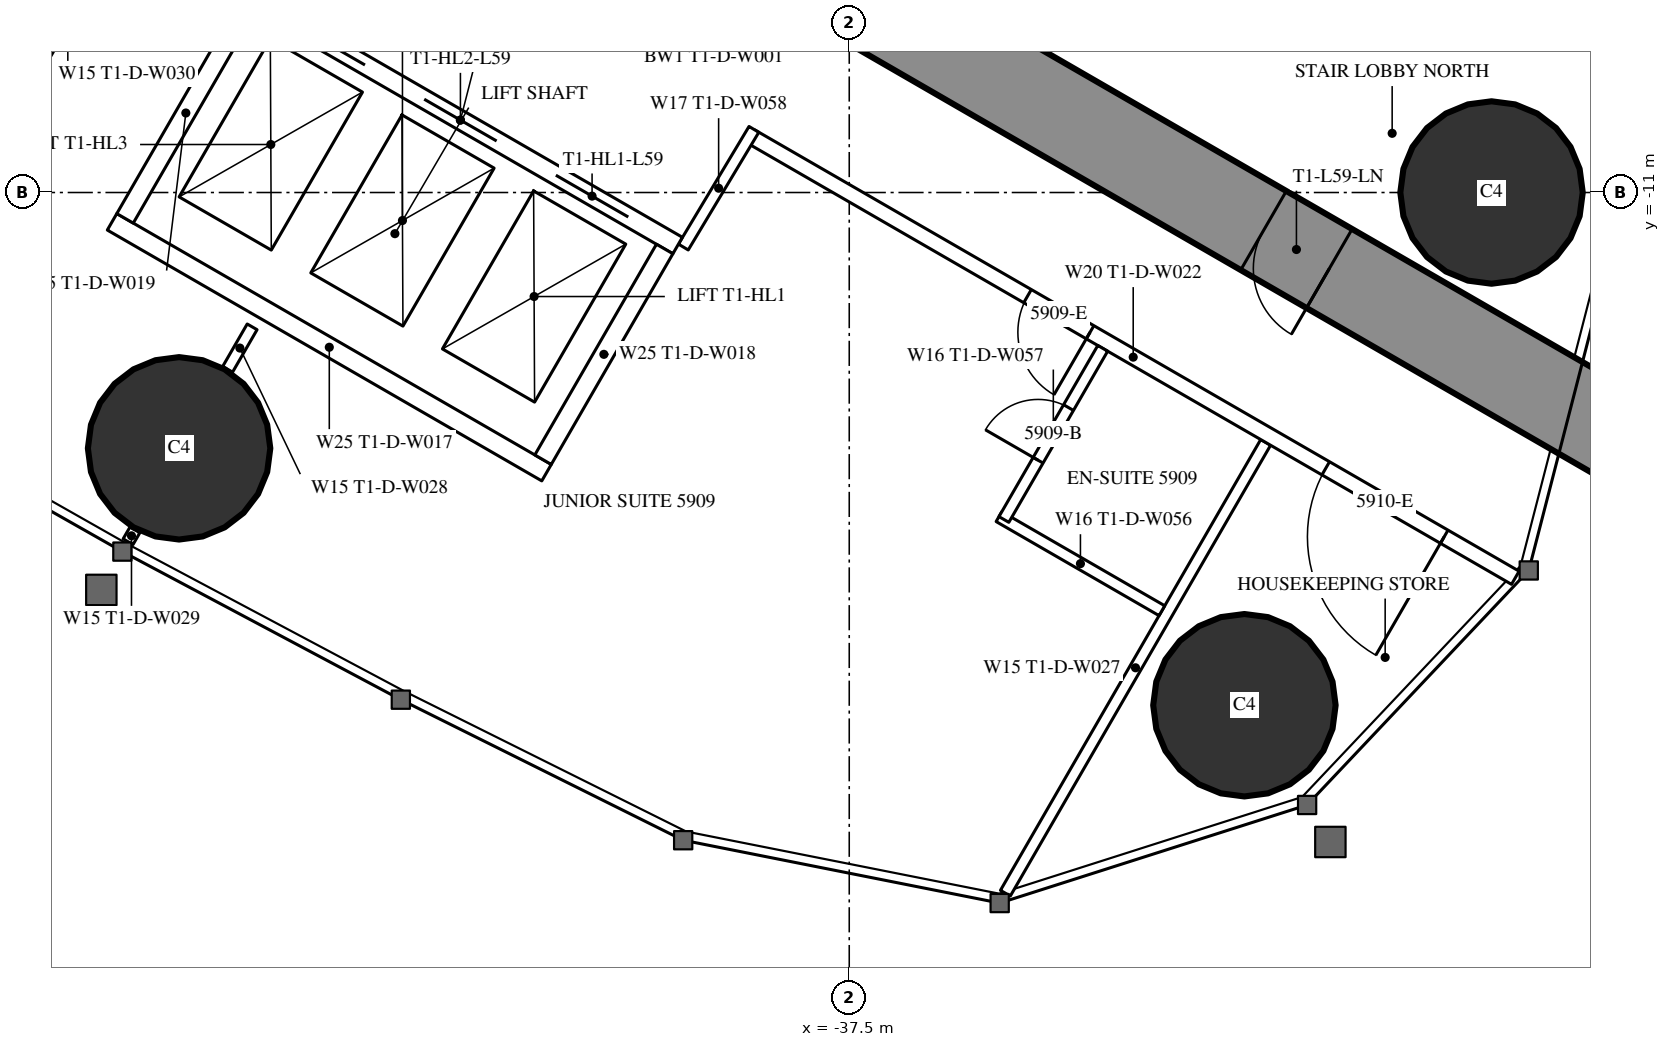
"""IFC4 building model, lengths in metres.
Left out: names, types, materials, properties, quantities, classifications, styles, units other than length and angle.
Written with IfcOpenShell. Run it as: python <this file> out.ifc"""

import sys

from ifc_helpers import new_model, si_unit, direction, frame, frame_2d, origin, origin_2d, place, context, subcontext, project, spatial, rectangle, circle, extrude, element, fill, save


model = new_model("IFC4")
c1 = context("Model", 3, precision=1e-05, world=origin(), true_north=direction((0.0, 1.0)))
c2 = subcontext(c1, "Body", "Model", "MODEL_VIEW")
j1 = project(units=[si_unit("LENGTHUNIT", "METRE"), si_unit("PLANEANGLEUNIT", "RADIAN")], contexts=[c1])
p1 = place(None, origin())
s1 = spatial("IfcSite", under=j1, at=p1, CompositionType="ELEMENT")
p2 = place(p1, origin())
s2 = spatial("IfcBuilding", under=s1, at=p2, CompositionType="ELEMENT")
p3 = place(p2, frame((0.0, 0.0, 222.5)))
s3 = spatial("IfcBuildingStorey", under=s2, at=p3, CompositionType="ELEMENT", Elevation=222.5)
for number, where, z_axis, x_axis in (
    (1, (-32.301, -17.745, 0.0), (0.0, 0.0, 1.0), (1.0, 0.0, 0.0)),
    (2, (-29.05, -11.0, 0.0), (0.0, 0.0, 1.0), (1.0, 0.0, 0.0)),
    (3, (-46.317, -14.365, 0.0), (0.0, 0.0, 1.0), (1.0, 0.0, 0.0)),
):
    element("IfcColumn", number, at=place(p3, frame(where, z_axis=z_axis, x_axis=x_axis)), inside=s3, PredefinedType="COLUMN", context=c2, shape_type="SweptSolid", body=[
        extrude(circle(Radius=1.2, at=origin_2d()), origin(), (0.0, 0.0, 1.0), 3.6),
    ])
p4 = place(p3, frame((-27.2, -14.3, 0.0), z_axis=(0.0, 0.0, 1.0), x_axis=(-0.866024021859, 0.500002393557, 0.0)))
e4 = element("IfcWall", 4, at=p4, inside=s3, PredefinedType="SHEAR", context=c2, shape_type="SweptSolid", body=[
    extrude(rectangle(XDim=27.907, YDim=1.2, at=frame_2d((13.954, 0.0))), origin(), (0.0, 0.0, 1.0), 3.6),
])
p5 = place(p4, frame((4.6, 0.0, 0.0)))
e5 = element("IfcOpeningElement", 5, at=p5, cuts=e4, PredefinedType="OPENING", context=c2, shape_type="SweptSolid", body=[
    extrude(rectangle(XDim=1.0, YDim=2.2, at=frame_2d((0.5, 1.1))), frame((0.0, 0.61, 0.0), z_axis=(0.0, -1.0, 0.0), x_axis=(1.0, 0.0, 0.0)), (0.0, 0.0, 1.0), 1.22),
])
p6 = place(p4, frame((13.395, 0.0, 0.0)))
e6 = element("IfcOpeningElement", 6, at=p6, cuts=e4, PredefinedType="OPENING", context=c2, shape_type="SweptSolid", body=[
    extrude(rectangle(XDim=1.8, YDim=2.2, at=frame_2d((0.9, 1.1))), frame((0.0, 0.61, 0.0), z_axis=(0.0, -1.0, 0.0), x_axis=(1.0, 0.0, 0.0)), (0.0, 0.0, 1.0), 1.22),
])
p7 = place(p3, frame((-32.022, -14.287, 0.0), z_axis=(0.0, 0.0, 1.0), x_axis=(-0.50000019414, -0.866025291697, 0.0)))
e7 = element("IfcWall", 7, at=p7, inside=s3, PredefinedType="PARTITIONING", context=c2, shape_type="SweptSolid", body=[
    extrude(rectangle(XDim=6.848, YDim=0.15, at=frame_2d((3.424, 0.0))), origin(), (0.0, 0.0, 1.0), 3.35),
])
p8 = place(p3, frame((-46.898, -15.439, 0.0), z_axis=(0.0, 0.0, 1.0), x_axis=(-0.500232303069, -0.865891241997, 0.0)))
e8 = element("IfcWall", 8, at=p8, inside=s3, PredefinedType="PARTITIONING", context=c2, shape_type="SweptSolid", body=[
    extrude(rectangle(XDim=0.18, YDim=0.15, at=frame_2d((0.09, 0.0))), origin(), (0.0, 0.0, 1.0), 2.45),
])
p9 = place(p3, frame((-46.274, -6.059, 0.0), z_axis=(0.0, 0.0, 1.0), x_axis=(-0.500020471368, -0.866013584312, 0.0)))
e9 = element("IfcWall", 9, at=p9, inside=s3, PredefinedType="PARTITIONING", context=c2, shape_type="SweptSolid", body=[
    extrude(rectangle(XDim=6.028, YDim=0.15, at=frame_2d((3.014, 0.0))), origin(), (0.0, 0.0, 1.0), 2.45),
])
p10 = place(p3, frame((-45.356, -12.767, 0.0), z_axis=(0.0, 0.0, 1.0), x_axis=(-0.499886366516, -0.866091000168, 0.0)))
e10 = element("IfcWall", 10, at=p10, inside=s3, PredefinedType="PARTITIONING", context=c2, shape_type="SweptSolid", body=[
    extrude(rectangle(XDim=0.645, YDim=0.15, at=frame_2d((0.322, 0.0))), origin(), (0.0, 0.0, 1.0), 3.35),
])
p11 = place(p3, frame((-28.737, -16.068, 0.0), z_axis=(0.0, 0.0, 1.0), x_axis=(-0.866029399323, 0.49999307946, 0.0)))
e11 = element("IfcWall", 11, at=p11, inside=s3, PredefinedType="PARTITIONING", context=c2, shape_type="SweptSolid", body=[
    extrude(rectangle(XDim=11.61, YDim=0.2, at=frame_2d((5.805, 0.0))), origin(), (0.0, 0.0, 1.0), 3.35),
])
p12 = place(p11, frame((1.08, 0.0, 0.0)))
e12 = element("IfcOpeningElement", 12, at=p12, cuts=e11, PredefinedType="OPENING", context=c2, shape_type="SweptSolid", body=[
    extrude(rectangle(XDim=1.8, YDim=2.03, at=frame_2d((0.9, 1.015))), frame((0.0, 0.11, 0.0), z_axis=(0.0, -1.0, 0.0), x_axis=(1.0, 0.0, 0.0)), (0.0, 0.0, 1.0), 0.22),
])
p13 = place(p11, frame((6.46, 0.0, 0.0)))
e13 = element("IfcOpeningElement", 13, at=p13, cuts=e11, PredefinedType="OPENING", context=c2, shape_type="SweptSolid", body=[
    extrude(rectangle(XDim=0.95, YDim=2.2, at=frame_2d((0.475, 1.1))), frame((0.0, 0.11, 0.0), z_axis=(0.0, -1.0, 0.0), x_axis=(1.0, 0.0, 0.0)), (0.0, 0.0, 1.0), 0.22),
])
p14 = place(p3, frame((-39.683, -11.718, 0.0), z_axis=(0.0, 0.0, 1.0), x_axis=(0.514336634837, 0.857588377991, 0.0)))
e14 = element("IfcWall", 14, at=p14, inside=s3, PredefinedType="PARTITIONING", context=c2, shape_type="SweptSolid", body=[
    extrude(rectangle(XDim=1.805, YDim=0.15, at=frame_2d((0.903, 0.0))), origin(), (0.0, 0.0, 1.0), 3.35),
])
p15 = place(p3, frame((-33.387, -16.502, 0.0), z_axis=(0.0, 0.0, 1.0), x_axis=(-0.866006523861, 0.500032699561, 0.0)))
e15 = element("IfcWall", 15, at=p15, inside=s3, PredefinedType="PARTITIONING", context=c2, shape_type="SweptSolid", body=[
    extrude(rectangle(XDim=2.475, YDim=0.15, at=frame_2d((1.237, 0.0))), origin(), (0.0, 0.0, 1.0), 3.35),
])
p16 = place(p3, frame((-34.165, -13.05, 0.0), z_axis=(0.0, 0.0, 1.0), x_axis=(-0.500047596559, -0.865997922154, 0.0)))
e16 = element("IfcWall", 16, at=p16, inside=s3, PredefinedType="PARTITIONING", context=c2, shape_type="SweptSolid", body=[
    extrude(rectangle(XDim=2.6, YDim=0.15, at=frame_2d((1.3, 0.0))), origin(), (0.0, 0.0, 1.0), 3.35),
])
p17 = place(p16, frame((0.9, 0.0, 0.0)))
e17 = element("IfcOpeningElement", 17, at=p17, cuts=e16, PredefinedType="OPENING", context=c2, shape_type="SweptSolid", body=[
    extrude(rectangle(XDim=0.8, YDim=2.2, at=frame_2d((0.4, 1.1))), frame((0.0, 0.085, 0.0), z_axis=(0.0, -1.0, 0.0), x_axis=(1.0, 0.0, 0.0)), (0.0, 0.0, 1.0), 0.17),
])
p18 = place(p3, frame((-39.758, -11.697, 0.0), z_axis=(0.0, 0.0, 1.0), x_axis=(-0.866024194504, 0.500002094529, 0.0)))
e18 = element("IfcWall", 18, at=p18, inside=s3, PredefinedType="PARTITIONING", context=c2, shape_type="SweptSolid", body=[
    extrude(rectangle(XDim=6.6, YDim=0.25, at=frame_2d((3.3, 0.0))), origin(), (0.0, 0.0, 1.0), 3.35),
])
p19 = place(p18, frame((0.75, 0.0, 0.0)))
e19 = element("IfcOpeningElement", 19, at=p19, cuts=e18, PredefinedType="OPENING", context=c2, shape_type="SweptSolid", body=[
    extrude(rectangle(XDim=1.1, YDim=2.2, at=frame_2d((0.55, 1.1))), frame((0.0, 0.135, 0.0), z_axis=(0.0, -1.0, 0.0), x_axis=(1.0, 0.0, 0.0)), (0.0, 0.0, 1.0), 0.27),
])
p20 = place(p18, frame((2.75, 0.0, 0.0)))
e20 = element("IfcOpeningElement", 20, at=p20, cuts=e18, PredefinedType="OPENING", context=c2, shape_type="SweptSolid", body=[
    extrude(rectangle(XDim=1.1, YDim=2.2, at=frame_2d((0.55, 1.1))), frame((0.0, 0.135, 0.0), z_axis=(0.0, -1.0, 0.0), x_axis=(1.0, 0.0, 0.0)), (0.0, 0.0, 1.0), 0.27),
])
p21 = place(p18, frame((4.75, 0.0, 0.0)))
e21 = element("IfcOpeningElement", 21, at=p21, cuts=e18, PredefinedType="OPENING", context=c2, shape_type="SweptSolid", body=[
    extrude(rectangle(XDim=1.1, YDim=2.2, at=frame_2d((0.55, 1.1))), frame((0.0, 0.135, 0.0), z_axis=(0.0, -1.0, 0.0), x_axis=(1.0, 0.0, 0.0)), (0.0, 0.0, 1.0), 0.27),
])
p22 = place(p3, frame((-41.482, -14.686, 0.0), z_axis=(0.0, 0.0, 1.0), x_axis=(-0.86603344179, 0.499986077507, 0.0)))
e22 = element("IfcWall", 22, at=p22, inside=s3, PredefinedType="PARTITIONING", context=c2, shape_type="SweptSolid", body=[
    extrude(rectangle(XDim=6.6, YDim=0.25, at=frame_2d((3.3, 0.0))), origin(), (0.0, 0.0, 1.0), 3.35),
])
for number, where, z_axis, x_axis in (
    (23, (-39.928, -11.743, 0.0), (0.0, 0.0, 1.0), (-0.5, -0.866, 0.0)),
    (24, (-45.428, -8.568, 0.0), (0.0, 0.0, 1.0), (-0.5, -0.866, 0.0)),
):
    element("IfcWall", number, at=place(p3, frame(where, z_axis=z_axis, x_axis=x_axis)), inside=s3, PredefinedType="PARTITIONING", context=c2, shape_type="SweptSolid", body=[
        extrude(rectangle(XDim=3.201, YDim=0.25, at=frame_2d((1.6, 0.0))), origin(), (0.0, 0.0, 1.0), 3.35),
    ])
p23 = place(p12, origin())
e25 = element("IfcDoor", 25, at=p23, inside=s3, OperationType="DOUBLE_DOOR_SINGLE_SWING", PredefinedType="DOOR", context=c2, shape_type="SweptSolid", body=[
    extrude(rectangle(XDim=1.8, YDim=2.03, at=frame_2d((0.9, 1.015))), frame((0.0, 0.025, 0.0), z_axis=(0.0, -1.0, 0.0), x_axis=(1.0, 0.0, 0.0)), (0.0, 0.0, 1.0), 0.05),
])
fill(e12, e25)
p24 = place(p17, origin())
e26 = element("IfcDoor", 26, at=p24, inside=s3, OperationType="SINGLE_SWING_RIGHT", PredefinedType="DOOR", context=c2, shape_type="SweptSolid", body=[
    extrude(rectangle(XDim=0.8, YDim=2.2, at=frame_2d((0.4, 1.1))), frame((0.0, 0.025, 0.0), z_axis=(0.0, -1.0, 0.0), x_axis=(1.0, 0.0, 0.0)), (0.0, 0.0, 1.0), 0.05),
])
fill(e17, e26)
p25 = place(p13, origin())
e27 = element("IfcDoor", 27, at=p25, inside=s3, OperationType="SINGLE_SWING_LEFT", PredefinedType="DOOR", context=c2, shape_type="SweptSolid", body=[
    extrude(rectangle(XDim=0.95, YDim=2.2, at=frame_2d((0.475, 1.1))), frame((0.0, 0.025, 0.0), z_axis=(0.0, -1.0, 0.0), x_axis=(1.0, 0.0, 0.0)), (0.0, 0.0, 1.0), 0.05),
])
fill(e13, e27)
p26 = place(p5, origin())
e28 = element("IfcDoor", 28, at=p26, inside=s3, OperationType="SINGLE_SWING_LEFT", PredefinedType="DOOR", context=c2, shape_type="SweptSolid", body=[
    extrude(rectangle(XDim=1.0, YDim=2.2, at=frame_2d((0.5, 1.1))), frame((0.0, 0.025, 0.0), z_axis=(0.0, -1.0, 0.0), x_axis=(1.0, 0.0, 0.0)), (0.0, 0.0, 1.0), 0.05),
])
fill(e5, e28)
p27 = place(p19, origin())
e29 = element("IfcDoor", 29, at=p27, inside=s3, OperationType="DOUBLE_DOOR_SLIDING", PredefinedType="USERDEFINED", context=c2, shape_type="SweptSolid", body=[
    extrude(rectangle(XDim=1.1, YDim=2.2, at=frame_2d((0.55, 1.1))), frame((0.0, 0.025, 0.0), z_axis=(0.0, -1.0, 0.0), x_axis=(1.0, 0.0, 0.0)), (0.0, 0.0, 1.0), 0.05),
])
fill(e19, e29)
p28 = place(p20, origin())
e30 = element("IfcDoor", 30, at=p28, inside=s3, OperationType="DOUBLE_DOOR_SLIDING", PredefinedType="USERDEFINED", context=c2, shape_type="SweptSolid", body=[
    extrude(rectangle(XDim=1.1, YDim=2.2, at=frame_2d((0.55, 1.1))), frame((0.0, 0.025, 0.0), z_axis=(0.0, -1.0, 0.0), x_axis=(1.0, 0.0, 0.0)), (0.0, 0.0, 1.0), 0.05),
])
fill(e20, e30)
p29 = place(p21, origin())
e31 = element("IfcDoor", 31, at=p29, inside=s3, OperationType="DOUBLE_DOOR_SLIDING", PredefinedType="USERDEFINED", context=c2, shape_type="SweptSolid", body=[
    extrude(rectangle(XDim=1.1, YDim=2.2, at=frame_2d((0.55, 1.1))), frame((0.0, 0.025, 0.0), z_axis=(0.0, -1.0, 0.0), x_axis=(1.0, 0.0, 0.0)), (0.0, 0.0, 1.0), 0.05),
])
fill(e21, e31)
save(model, sys.argv[1])
